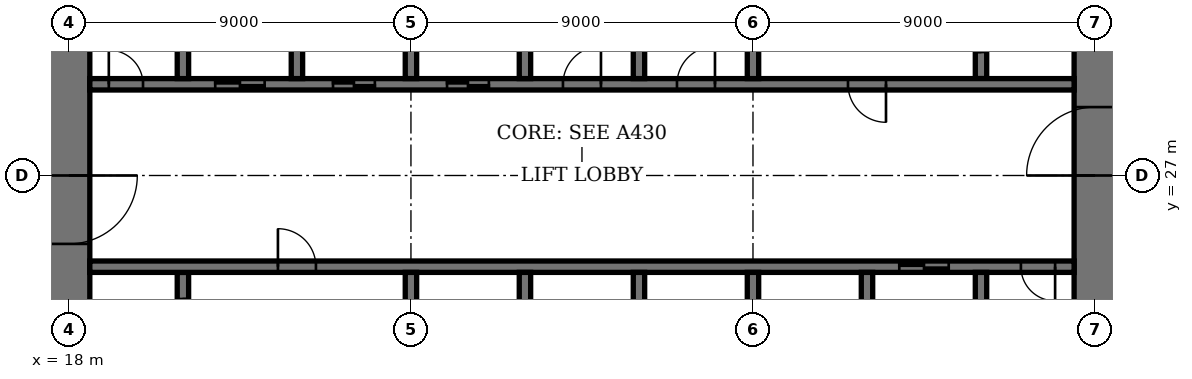
"""IFC4 building model, lengths in metres.
Left out: names, types, materials, properties, quantities, classifications, styles, units other than length and angle.
Written with IfcOpenShell. Run it as: python <this file> out.ifc"""

import sys

from ifc_helpers import new_model, si_unit, direction, frame, frame_2d, origin, place, context, subcontext, project, spatial, rectangle, extrude, element, fill, save


model = new_model("IFC4")
c1 = context("Model", 3, precision=1e-05, world=origin(), true_north=direction((0.0, 1.0)))
c2 = subcontext(c1, "Body", "Model", "MODEL_VIEW")
j1 = project(units=[si_unit("LENGTHUNIT", "METRE"), si_unit("PLANEANGLEUNIT", "RADIAN")], contexts=[c1])
p1 = place(None, origin())
s1 = spatial("IfcSite", under=j1, at=p1, CompositionType="ELEMENT")
p2 = place(p1, origin())
s2 = spatial("IfcBuilding", under=s1, at=p2, CompositionType="ELEMENT")
p3 = place(p2, frame((0.0, 0.0, 198.2)))
s3 = spatial("IfcBuildingStorey", under=s2, at=p3, CompositionType="ELEMENT", Elevation=198.2)
p4 = place(p3, frame((18.0, 35.45, 0.0), z_axis=(0.0, 0.0, 1.0), x_axis=(0.0, -1.0, 0.0)))
e1 = element("IfcWall", 1, at=p4, inside=s3, PredefinedType="SHEAR", context=c2, shape_type="SweptSolid", body=[
    extrude(rectangle(XDim=16.9, YDim=1.1, at=frame_2d((8.45, 0.0))), origin(), (0.0, 0.0, 1.0), 4.0),
])
p5 = place(p4, frame((8.45, 0.0, 0.0)))
e2 = element("IfcOpeningElement", 2, at=p5, cuts=e1, PredefinedType="OPENING", context=c2, shape_type="SweptSolid", body=[
    extrude(rectangle(XDim=1.8, YDim=2.4, at=frame_2d((0.9, 1.2))), frame((0.0, 0.56, 0.0), z_axis=(0.0, -1.0, 0.0), x_axis=(1.0, 0.0, 0.0)), (0.0, 0.0, 1.0), 1.12),
])
p6 = place(p3, frame((45.0, 18.55, 0.0), z_axis=(0.0, 0.0, 1.0), x_axis=(0.0, 1.0, 0.0)))
e3 = element("IfcWall", 3, at=p6, inside=s3, PredefinedType="SHEAR", context=c2, shape_type="SweptSolid", body=[
    extrude(rectangle(XDim=16.9, YDim=1.1, at=frame_2d((8.45, 0.0))), origin(), (0.0, 0.0, 1.0), 4.0),
])
p7 = place(p6, frame((8.45, 0.0, 0.0)))
e4 = element("IfcOpeningElement", 4, at=p7, cuts=e3, PredefinedType="OPENING", context=c2, shape_type="SweptSolid", body=[
    extrude(rectangle(XDim=1.8, YDim=2.4, at=frame_2d((0.9, 1.2))), frame((0.0, 0.56, 0.0), z_axis=(0.0, -1.0, 0.0), x_axis=(1.0, 0.0, 0.0)), (0.0, 0.0, 1.0), 1.12),
])
p8 = place(p3, frame((21.0, 21.95, 0.0), z_axis=(0.0, 0.0, 1.0), x_axis=(0.0, 1.0, 0.0)))
e5 = element("IfcWall", 5, at=p8, inside=s3, PredefinedType="SHEAR", context=c2, shape_type="SweptSolid", body=[
    extrude(rectangle(XDim=2.5, YDim=0.3, at=frame_2d((1.25, 0.0))), origin(), (0.0, 0.0, 1.0), 4.0),
])
p9 = place(p8, frame((0.7, 0.0, 0.0)))
e6 = element("IfcOpeningElement", 6, at=p9, cuts=e5, PredefinedType="OPENING", context=c2, shape_type="SweptSolid", body=[
    extrude(rectangle(XDim=1.1, YDim=2.4, at=frame_2d((0.55, 1.2))), frame((0.0, 0.16, 0.0), z_axis=(0.0, -1.0, 0.0), x_axis=(1.0, 0.0, 0.0)), (0.0, 0.0, 1.0), 0.32),
])
p10 = place(p3, frame((42.0, 29.55, 0.0), z_axis=(0.0, 0.0, 1.0), x_axis=(0.0, 1.0, 0.0)))
e7 = element("IfcWall", 7, at=p10, inside=s3, PredefinedType="SHEAR", context=c2, shape_type="SweptSolid", body=[
    extrude(rectangle(XDim=2.5, YDim=0.3, at=frame_2d((1.25, 0.0))), origin(), (0.0, 0.0, 1.0), 4.0),
])
p11 = place(p10, frame((0.7, 0.0, 0.0)))
e8 = element("IfcOpeningElement", 8, at=p11, cuts=e7, PredefinedType="OPENING", context=c2, shape_type="SweptSolid", body=[
    extrude(rectangle(XDim=1.1, YDim=2.4, at=frame_2d((0.55, 1.2))), frame((0.0, 0.16, 0.0), z_axis=(0.0, -1.0, 0.0), x_axis=(1.0, 0.0, 0.0)), (0.0, 0.0, 1.0), 0.32),
])
p12 = place(p3, frame((18.55, 24.6, 0.0), z_axis=(0.0, 0.0, 1.0), x_axis=(1.0, 0.0, 0.0)))
e9 = element("IfcWall", 9, at=p12, inside=s3, PredefinedType="SHEAR", context=c2, shape_type="SweptSolid", body=[
    extrude(rectangle(XDim=25.9, YDim=0.3, at=frame_2d((12.95, 0.0))), origin(), (0.0, 0.0, 1.0), 4.0),
])
p13 = place(p12, frame((4.95, 0.0, 0.0)))
e10 = element("IfcOpeningElement", 10, at=p13, cuts=e9, PredefinedType="OPENING", context=c2, shape_type="SweptSolid", body=[
    extrude(rectangle(XDim=1.0, YDim=2.4, at=frame_2d((0.5, 1.2))), frame((0.0, 0.16, 0.0), z_axis=(0.0, -1.0, 0.0), x_axis=(1.0, 0.0, 0.0)), (0.0, 0.0, 1.0), 0.32),
])
p14 = place(p12, frame((24.5, 0.0, 0.0)))
e11 = element("IfcOpeningElement", 11, at=p14, cuts=e9, PredefinedType="OPENING", context=c2, shape_type="SweptSolid", body=[
    extrude(rectangle(XDim=0.9, YDim=2.1, at=frame_2d((0.45, 1.05))), frame((0.0, 0.16, 0.0), z_axis=(0.0, -1.0, 0.0), x_axis=(1.0, 0.0, 0.0)), (0.0, 0.0, 1.0), 0.32),
])
p15 = place(p12, frame((21.3, 0.0, 0.0)))
e12 = element("IfcOpeningElement", 12, at=p15, cuts=e9, PredefinedType="OPENING", context=c2, shape_type="SweptSolid", body=[
    extrude(rectangle(XDim=1.3, YDim=2.4, at=frame_2d((0.65, 1.2))), frame((0.0, 0.16, 0.0), z_axis=(0.0, -1.0, 0.0), x_axis=(1.0, 0.0, 0.0)), (0.0, 0.0, 1.0), 0.32),
])
p16 = place(p3, frame((18.55, 29.4, 0.0), z_axis=(0.0, 0.0, 1.0), x_axis=(1.0, 0.0, 0.0)))
e13 = element("IfcWall", 13, at=p16, inside=s3, PredefinedType="SHEAR", context=c2, shape_type="SweptSolid", body=[
    extrude(rectangle(XDim=25.9, YDim=0.3, at=frame_2d((12.95, 0.0))), origin(), (0.0, 0.0, 1.0), 4.0),
])
p17 = place(p16, frame((19.95, 0.0, 0.0)))
e14 = element("IfcOpeningElement", 14, at=p17, cuts=e13, PredefinedType="OPENING", context=c2, shape_type="SweptSolid", body=[
    extrude(rectangle(XDim=1.0, YDim=2.4, at=frame_2d((0.5, 1.2))), frame((0.0, 0.16, 0.0), z_axis=(0.0, -1.0, 0.0), x_axis=(1.0, 0.0, 0.0)), (0.0, 0.0, 1.0), 0.32),
])
p18 = place(p16, frame((0.5, 0.0, 0.0)))
e15 = element("IfcOpeningElement", 15, at=p18, cuts=e13, PredefinedType="OPENING", context=c2, shape_type="SweptSolid", body=[
    extrude(rectangle(XDim=0.9, YDim=2.1, at=frame_2d((0.45, 1.05))), frame((0.0, 0.16, 0.0), z_axis=(0.0, -1.0, 0.0), x_axis=(1.0, 0.0, 0.0)), (0.0, 0.0, 1.0), 0.32),
])
p19 = place(p16, frame((15.45, 0.0, 0.0)))
e16 = element("IfcOpeningElement", 16, at=p19, cuts=e13, PredefinedType="OPENING", context=c2, shape_type="SweptSolid", body=[
    extrude(rectangle(XDim=1.0, YDim=2.4, at=frame_2d((0.5, 1.2))), frame((0.0, 0.16, 0.0), z_axis=(0.0, -1.0, 0.0), x_axis=(1.0, 0.0, 0.0)), (0.0, 0.0, 1.0), 0.32),
])
p20 = place(p16, frame((12.45, 0.0, 0.0)))
e17 = element("IfcOpeningElement", 17, at=p20, cuts=e13, PredefinedType="OPENING", context=c2, shape_type="SweptSolid", body=[
    extrude(rectangle(XDim=1.0, YDim=2.4, at=frame_2d((0.5, 1.2))), frame((0.0, 0.16, 0.0), z_axis=(0.0, -1.0, 0.0), x_axis=(1.0, 0.0, 0.0)), (0.0, 0.0, 1.0), 0.32),
])
p21 = place(p16, frame((9.4, 0.0, 0.0)))
e18 = element("IfcOpeningElement", 18, at=p21, cuts=e13, PredefinedType="OPENING", context=c2, shape_type="SweptSolid", body=[
    extrude(rectangle(XDim=1.1, YDim=2.4, at=frame_2d((0.55, 1.2))), frame((0.0, 0.16, 0.0), z_axis=(0.0, -1.0, 0.0), x_axis=(1.0, 0.0, 0.0)), (0.0, 0.0, 1.0), 0.32),
])
p22 = place(p16, frame((6.4, 0.0, 0.0)))
e19 = element("IfcOpeningElement", 19, at=p22, cuts=e13, PredefinedType="OPENING", context=c2, shape_type="SweptSolid", body=[
    extrude(rectangle(XDim=1.1, YDim=2.4, at=frame_2d((0.55, 1.2))), frame((0.0, 0.16, 0.0), z_axis=(0.0, -1.0, 0.0), x_axis=(1.0, 0.0, 0.0)), (0.0, 0.0, 1.0), 0.32),
])
p23 = place(p16, frame((3.3, 0.0, 0.0)))
e20 = element("IfcOpeningElement", 20, at=p23, cuts=e13, PredefinedType="OPENING", context=c2, shape_type="SweptSolid", body=[
    extrude(rectangle(XDim=1.3, YDim=2.4, at=frame_2d((0.65, 1.2))), frame((0.0, 0.16, 0.0), z_axis=(0.0, -1.0, 0.0), x_axis=(1.0, 0.0, 0.0)), (0.0, 0.0, 1.0), 0.32),
])
for number, where, z_axis, x_axis in (
    (21, (30.0, 21.75, 0.0), (0.0, 0.0, 1.0), (0.0, 1.0, 0.0)),
    (22, (33.0, 29.55, 0.0), (0.0, 0.0, 1.0), (0.0, 1.0, 0.0)),
    (23, (33.0, 21.75, 0.0), (0.0, 0.0, 1.0), (0.0, 1.0, 0.0)),
    (24, (30.0, 29.55, 0.0), (0.0, 0.0, 1.0), (0.0, 1.0, 0.0)),
    (25, (36.0, 21.75, 0.0), (0.0, 0.0, 1.0), (0.0, 1.0, 0.0)),
    (26, (27.0, 29.55, 0.0), (0.0, 0.0, 1.0), (0.0, 1.0, 0.0)),
):
    element("IfcWall", number, at=place(p3, frame(where, z_axis=z_axis, x_axis=x_axis)), inside=s3, PredefinedType="SHEAR", context=c2, shape_type="SweptSolid", body=[
        extrude(rectangle(XDim=2.7, YDim=0.3, at=frame_2d((1.35, 0.0))), origin(), (0.0, 0.0, 1.0), 4.0),
    ])
for number, where, z_axis, x_axis in (
    (27, (39.0, 18.55, 0.0), (0.0, 0.0, 1.0), (0.0, 1.0, 0.0)),
    (28, (24.0, 29.55, 0.0), (0.0, 0.0, 1.0), (0.0, 1.0, 0.0)),
):
    element("IfcWall", number, at=place(p3, frame(where, z_axis=z_axis, x_axis=x_axis)), inside=s3, PredefinedType="SHEAR", context=c2, shape_type="SweptSolid", body=[
        extrude(rectangle(XDim=5.9, YDim=0.3, at=frame_2d((2.95, 0.0))), origin(), (0.0, 0.0, 1.0), 4.0),
    ])
for number, where, z_axis, x_axis in (
    (29, (42.0, 21.75, 0.0), (0.0, 0.0, 1.0), (0.0, 1.0, 0.0)),
    (30, (21.0, 29.55, 0.0), (0.0, 0.0, 1.0), (0.0, 1.0, 0.0)),
):
    element("IfcWall", number, at=place(p3, frame(where, z_axis=z_axis, x_axis=x_axis)), inside=s3, PredefinedType="SHEAR", context=c2, shape_type="SweptSolid", body=[
        extrude(rectangle(XDim=2.7, YDim=0.3, at=frame_2d((1.35, 0.0))), origin(), (0.0, 0.0, 1.0), 4.0),
    ])
for number, where, z_axis, x_axis in (
    (31, (27.0, 21.6, 0.0), (0.0, 0.0, 1.0), (0.0, 1.0, 0.0)),
    (32, (36.0, 29.55, 0.0), (0.0, 0.0, 1.0), (0.0, 1.0, 0.0)),
):
    element("IfcWall", number, at=place(p3, frame(where, z_axis=z_axis, x_axis=x_axis)), inside=s3, PredefinedType="SHEAR", context=c2, shape_type="SweptSolid", body=[
        extrude(rectangle(XDim=2.85, YDim=0.3, at=frame_2d((1.425, 0.0))), origin(), (0.0, 0.0, 1.0), 4.0),
    ])
p24 = place(p5, origin())
e33 = element("IfcDoor", 33, at=p24, inside=s3, OperationType="DOUBLE_DOOR_DOUBLE_SWING", PredefinedType="DOOR", context=c2, shape_type="SweptSolid", body=[
    extrude(rectangle(XDim=1.8, YDim=2.4, at=frame_2d((0.9, 1.2))), frame((0.0, 0.03, 0.0), z_axis=(0.0, -1.0, 0.0), x_axis=(1.0, 0.0, 0.0)), (0.0, 0.0, 1.0), 0.06),
    extrude(rectangle(XDim=0.04, YDim=2.4, at=frame_2d((0.02, 1.2))), frame((0.0, 0.55, 0.0), z_axis=(0.0, -1.0, 0.0), x_axis=(1.0, 0.0, 0.0)), (0.0, 0.0, 1.0), 1.1),
    extrude(rectangle(XDim=0.04, YDim=2.4, at=frame_2d((1.78, 1.2))), frame((0.0, 0.55, 0.0), z_axis=(0.0, -1.0, 0.0), x_axis=(1.0, 0.0, 0.0)), (0.0, 0.0, 1.0), 1.1),
    extrude(rectangle(XDim=1.8, YDim=0.04, at=frame_2d((0.9, 2.38))), frame((0.0, 0.55, 0.0), z_axis=(0.0, -1.0, 0.0), x_axis=(1.0, 0.0, 0.0)), (0.0, 0.0, 1.0), 1.1),
])
fill(e2, e33)
p25 = place(p7, origin())
e34 = element("IfcDoor", 34, at=p25, inside=s3, OperationType="DOUBLE_DOOR_DOUBLE_SWING", PredefinedType="DOOR", context=c2, shape_type="SweptSolid", body=[
    extrude(rectangle(XDim=1.8, YDim=2.4, at=frame_2d((0.9, 1.2))), frame((0.0, 0.03, 0.0), z_axis=(0.0, -1.0, 0.0), x_axis=(1.0, 0.0, 0.0)), (0.0, 0.0, 1.0), 0.06),
    extrude(rectangle(XDim=0.04, YDim=2.4, at=frame_2d((0.02, 1.2))), frame((0.0, 0.55, 0.0), z_axis=(0.0, -1.0, 0.0), x_axis=(1.0, 0.0, 0.0)), (0.0, 0.0, 1.0), 1.1),
    extrude(rectangle(XDim=0.04, YDim=2.4, at=frame_2d((1.78, 1.2))), frame((0.0, 0.55, 0.0), z_axis=(0.0, -1.0, 0.0), x_axis=(1.0, 0.0, 0.0)), (0.0, 0.0, 1.0), 1.1),
    extrude(rectangle(XDim=1.8, YDim=0.04, at=frame_2d((0.9, 2.38))), frame((0.0, 0.55, 0.0), z_axis=(0.0, -1.0, 0.0), x_axis=(1.0, 0.0, 0.0)), (0.0, 0.0, 1.0), 1.1),
])
fill(e4, e34)
p26 = place(p13, origin())
e35 = element("IfcDoor", 35, at=p26, inside=s3, OperationType="SINGLE_SWING_RIGHT", PredefinedType="DOOR", context=c2, shape_type="SweptSolid", body=[
    extrude(rectangle(XDim=1.0, YDim=2.4, at=frame_2d((0.5, 1.2))), frame((0.0, 0.03, 0.0), z_axis=(0.0, -1.0, 0.0), x_axis=(1.0, 0.0, 0.0)), (0.0, 0.0, 1.0), 0.06),
])
fill(e10, e35)
p27 = place(p17, origin())
e36 = element("IfcDoor", 36, at=p27, inside=s3, OperationType="SINGLE_SWING_RIGHT", PredefinedType="DOOR", context=c2, shape_type="SweptSolid", body=[
    extrude(rectangle(XDim=1.0, YDim=2.4, at=frame_2d((0.5, 1.2))), frame((0.0, 0.03, 0.0), z_axis=(0.0, -1.0, 0.0), x_axis=(1.0, 0.0, 0.0)), (0.0, 0.0, 1.0), 0.06),
])
fill(e14, e36)
p28 = place(p14, origin())
e37 = element("IfcDoor", 37, at=p28, inside=s3, OperationType="SINGLE_SWING_RIGHT", PredefinedType="DOOR", context=c2, shape_type="SweptSolid", body=[
    extrude(rectangle(XDim=0.9, YDim=2.1, at=frame_2d((0.45, 1.05))), frame((0.0, 0.03, 0.0), z_axis=(0.0, -1.0, 0.0), x_axis=(1.0, 0.0, 0.0)), (0.0, 0.0, 1.0), 0.06),
])
fill(e11, e37)
p29 = place(p18, origin())
e38 = element("IfcDoor", 38, at=p29, inside=s3, OperationType="SINGLE_SWING_RIGHT", PredefinedType="DOOR", context=c2, shape_type="SweptSolid", body=[
    extrude(rectangle(XDim=0.9, YDim=2.1, at=frame_2d((0.45, 1.05))), frame((0.0, 0.03, 0.0), z_axis=(0.0, -1.0, 0.0), x_axis=(1.0, 0.0, 0.0)), (0.0, 0.0, 1.0), 0.06),
])
fill(e15, e38)
p30 = place(p19, origin())
e39 = element("IfcDoor", 39, at=p30, inside=s3, OperationType="SINGLE_SWING_LEFT", PredefinedType="DOOR", context=c2, shape_type="SweptSolid", body=[
    extrude(rectangle(XDim=1.0, YDim=2.4, at=frame_2d((0.5, 1.2))), frame((0.0, 0.03, 0.0), z_axis=(0.0, -1.0, 0.0), x_axis=(1.0, 0.0, 0.0)), (0.0, 0.0, 1.0), 0.06),
])
fill(e16, e39)
p31 = place(p20, origin())
e40 = element("IfcDoor", 40, at=p31, inside=s3, OperationType="SINGLE_SWING_LEFT", PredefinedType="DOOR", context=c2, shape_type="SweptSolid", body=[
    extrude(rectangle(XDim=1.0, YDim=2.4, at=frame_2d((0.5, 1.2))), frame((0.0, 0.03, 0.0), z_axis=(0.0, -1.0, 0.0), x_axis=(1.0, 0.0, 0.0)), (0.0, 0.0, 1.0), 0.06),
])
fill(e17, e40)
p32 = place(p21, origin())
e41 = element("IfcDoor", 41, at=p32, inside=s3, OperationType="DOUBLE_DOOR_SLIDING", PredefinedType="DOOR", context=c2, shape_type="SweptSolid", body=[
    extrude(rectangle(XDim=1.1, YDim=2.4, at=frame_2d((0.55, 1.2))), frame((0.0, 0.02, 0.0), z_axis=(0.0, -1.0, 0.0), x_axis=(1.0, 0.0, 0.0)), (0.0, 0.0, 1.0), 0.04),
])
fill(e18, e41)
p33 = place(p22, origin())
e42 = element("IfcDoor", 42, at=p33, inside=s3, OperationType="DOUBLE_DOOR_SLIDING", PredefinedType="DOOR", context=c2, shape_type="SweptSolid", body=[
    extrude(rectangle(XDim=1.1, YDim=2.4, at=frame_2d((0.55, 1.2))), frame((0.0, 0.02, 0.0), z_axis=(0.0, -1.0, 0.0), x_axis=(1.0, 0.0, 0.0)), (0.0, 0.0, 1.0), 0.04),
])
fill(e19, e42)
p34 = place(p15, origin())
e43 = element("IfcDoor", 43, at=p34, inside=s3, OperationType="DOUBLE_DOOR_SLIDING", PredefinedType="DOOR", context=c2, shape_type="SweptSolid", body=[
    extrude(rectangle(XDim=1.3, YDim=2.4, at=frame_2d((0.65, 1.2))), frame((0.0, 0.02, 0.0), z_axis=(0.0, -1.0, 0.0), x_axis=(1.0, 0.0, 0.0)), (0.0, 0.0, 1.0), 0.04),
])
fill(e12, e43)
p35 = place(p23, origin())
e44 = element("IfcDoor", 44, at=p35, inside=s3, OperationType="DOUBLE_DOOR_SLIDING", PredefinedType="DOOR", context=c2, shape_type="SweptSolid", body=[
    extrude(rectangle(XDim=1.3, YDim=2.4, at=frame_2d((0.65, 1.2))), frame((0.0, 0.02, 0.0), z_axis=(0.0, -1.0, 0.0), x_axis=(1.0, 0.0, 0.0)), (0.0, 0.0, 1.0), 0.04),
])
fill(e20, e44)
save(model, sys.argv[1])
